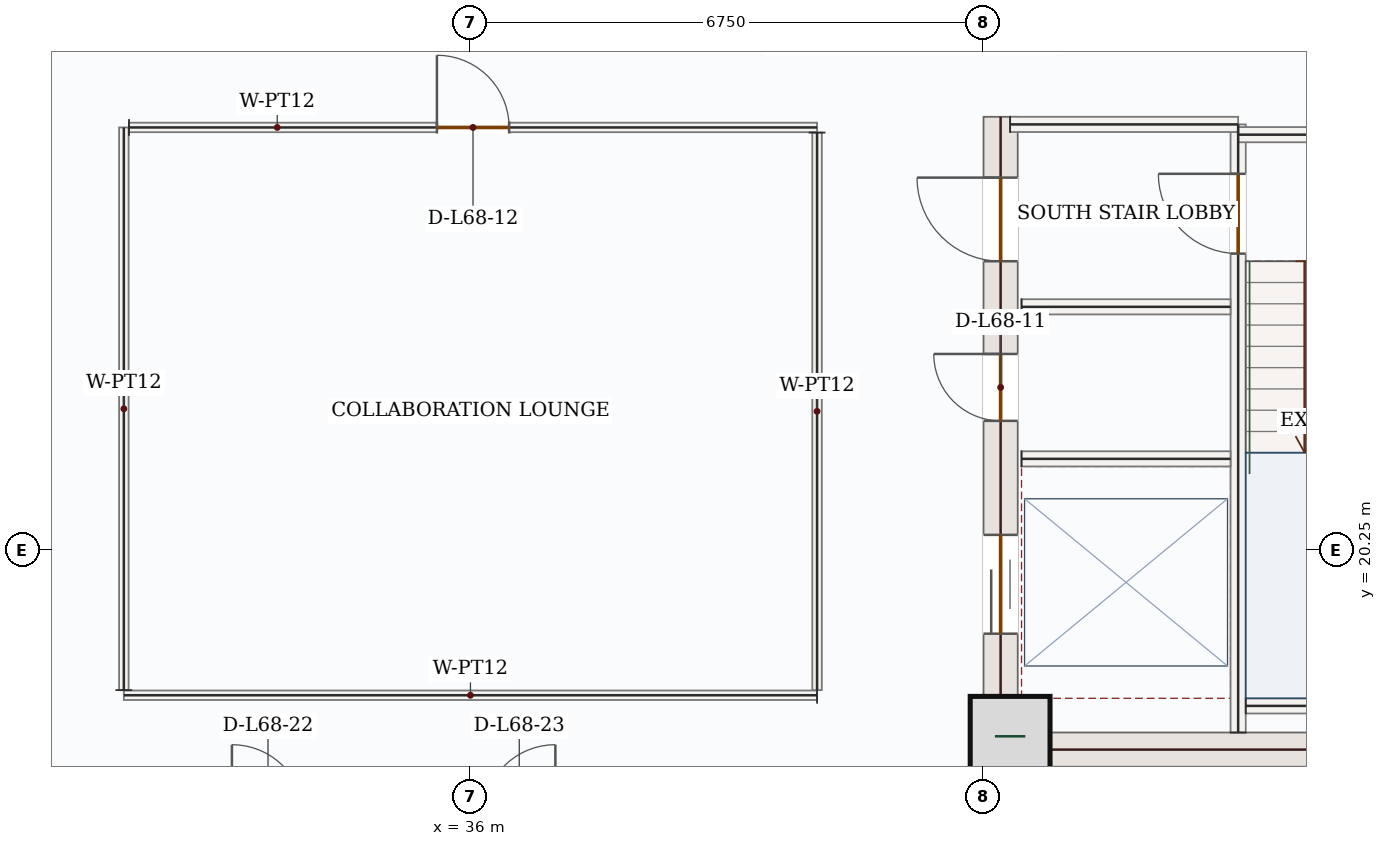
"""IFC4 building model, lengths in metres.
Left out: names, types, materials, properties, quantities, classifications, styles, units other than length and angle.
Written with IfcOpenShell. Run it as: python <this file> out.ifc"""

import sys

from ifc_helpers import new_model, si_unit, direction, frame, frame_2d, origin, origin_2d, place, context, subcontext, project, spatial, rectangle, extrude, source, transform, mapped, element, fill, save


model = new_model("IFC4")
c1 = context("Model", 3, precision=1e-05, world=origin(), true_north=direction((0.0, 1.0)))
c2 = subcontext(c1, "Body", "Model", "MODEL_VIEW")
j1 = project(units=[si_unit("LENGTHUNIT", "METRE"), si_unit("PLANEANGLEUNIT", "RADIAN")], contexts=[c1])
p1 = place(None, origin())
s1 = spatial("IfcSite", under=j1, at=p1, CompositionType="ELEMENT")
p2 = place(p1, origin())
s2 = spatial("IfcBuilding", under=s1, at=p2, CompositionType="ELEMENT")
p3 = place(p2, frame((0.0, 0.0, 284.1)))
s3 = spatial("IfcBuildingStorey", under=s2, at=p3, CompositionType="ELEMENT", Elevation=284.1)
p4 = place(p3, frame((42.975, 17.4, 0.0), z_axis=(0.0, 0.0, 1.0), x_axis=(0.0, 1.0, 0.0)))
e1 = element("IfcWall", 1, at=p4, inside=s3, PredefinedType="SHEAR", context=c2, shape_type="SweptSolid", body=[
    extrude(rectangle(XDim=8.55, YDim=0.45, at=frame_2d((4.275, 0.0))), origin(), (0.0, 0.0, 1.0), 3.5),
])
p5 = place(p4, frame((6.65, 0.0, 0.0)))
e2 = element("IfcOpeningElement", 2, at=p5, cuts=e1, PredefinedType="OPENING", context=c2, shape_type="SweptSolid", body=[
    extrude(rectangle(XDim=1.1, YDim=2.2, at=frame_2d((0.55, 1.1))), frame((0.0, 0.235, 0.0), z_axis=(0.0, -1.0, 0.0), x_axis=(1.0, 0.0, 0.0)), (0.0, 0.0, 1.0), 0.47),
])
p6 = place(p4, frame((1.75, 0.0, 0.0)))
e3 = element("IfcOpeningElement", 3, at=p6, cuts=e1, PredefinedType="OPENING", context=c2, shape_type="SweptSolid", body=[
    extrude(rectangle(XDim=1.3, YDim=2.2, at=frame_2d((0.65, 1.1))), frame((0.0, 0.235, 0.0), z_axis=(0.0, -1.0, 0.0), x_axis=(1.0, 0.0, 0.0)), (0.0, 0.0, 1.0), 0.47),
])
p7 = place(p4, frame((4.55, 0.0, 0.0)))
e4 = element("IfcOpeningElement", 4, at=p7, cuts=e1, PredefinedType="OPENING", context=c2, shape_type="SweptSolid", body=[
    extrude(rectangle(XDim=0.88, YDim=2.1, at=frame_2d((0.44, 1.05))), frame((0.0, 0.235, 0.0), z_axis=(0.0, -1.0, 0.0), x_axis=(1.0, 0.0, 0.0)), (0.0, 0.0, 1.0), 0.47),
])
m1 = source(origin(), c2, "Body", "SweptSolid", [
    extrude(rectangle(XDim=7.1, YDim=0.45, at=frame_2d((3.55, 0.0))), origin(), (0.0, 0.0, 1.0), 3.5),
])
p8 = place(p3, frame((43.2, 17.625, 0.0), z_axis=(0.0, 0.0, 1.0), x_axis=(1.0, 0.0, 0.0)))
e5 = element("IfcWall", 5, at=p8, inside=s3, PredefinedType="SHEAR", context=c2, shape_type="MappedRepresentation", body=[
    mapped(m1, transform((0.0, 0.0, 0.0), x_axis=(1.0, 0.0, 0.0), y_axis=(0.0, 1.0, 0.0), z_axis=(0.0, 0.0, 1.0), scale=1.0)),
])
m2 = source(origin(), c2, "Body", "SweptSolid", [
    extrude(rectangle(XDim=1.05, YDim=1.05, at=origin_2d()), origin(), (0.0, 0.0, 1.0), 3.75),
])
p9 = place(p3, frame((43.1, 17.8, 0.0), z_axis=(0.0, 0.0, 1.0), x_axis=(1.0, 0.0, 0.0)))
e6 = element("IfcColumn", 6, at=p9, inside=s3, PredefinedType="COLUMN", context=c2, shape_type="MappedRepresentation", body=[
    mapped(m2, transform((0.0, 0.0, 0.0), x_axis=(1.0, 0.0, 0.0), y_axis=(0.0, 1.0, 0.0), z_axis=(0.0, 0.0, 1.0), scale=1.0)),
])
p10 = place(p3, frame((46.1, 17.85, 0.0), z_axis=(0.0, 0.0, 1.0), x_axis=(0.0, 1.0, 0.0)))
e7 = element("IfcWall", 7, at=p10, inside=s3, PredefinedType="SOLIDWALL", context=c2, shape_type="SweptSolid", body=[
    extrude(rectangle(XDim=8.0, YDim=0.2, at=frame_2d((4.0, 0.0))), origin(), (0.0, 0.0, 1.0), 3.5),
])
p11 = place(p10, frame((6.3, 0.0, 0.0)))
e8 = element("IfcOpeningElement", 8, at=p11, cuts=e7, PredefinedType="OPENING", context=c2, shape_type="SweptSolid", body=[
    extrude(rectangle(XDim=1.05, YDim=2.15, at=frame_2d((0.525, 1.075))), frame((0.0, 0.11, 0.0), z_axis=(0.0, -1.0, 0.0), x_axis=(1.0, 0.0, 0.0)), (0.0, 0.0, 1.0), 0.22),
])
m3 = source(origin(), c2, "Body", "SweptSolid", [
    extrude(rectangle(XDim=3.0, YDim=0.2, at=frame_2d((1.5, 0.0))), origin(), (0.0, 0.0, 1.0), 3.5),
])
p12 = place(p3, frame((43.1, 25.85, 0.0), z_axis=(0.0, 0.0, 1.0), x_axis=(1.0, 0.0, 0.0)))
e9 = element("IfcWall", 9, at=p12, inside=s3, PredefinedType="SOLIDWALL", context=c2, shape_type="MappedRepresentation", body=[
    mapped(m3, transform((0.0, 0.0, 0.0), x_axis=(1.0, 0.0, 0.0), y_axis=(0.0, 1.0, 0.0), z_axis=(0.0, 0.0, 1.0), scale=1.0)),
])
m4 = source(origin(), c2, "Body", "SweptSolid", [
    extrude(rectangle(XDim=4.25, YDim=0.2, at=frame_2d((2.125, 0.0))), origin(), (0.0, 0.0, 1.0), 3.5),
])
p13 = place(p3, frame((46.1, 25.715, 0.0), z_axis=(0.0, 0.0, 1.0), x_axis=(1.0, 0.0, 0.0)))
e10 = element("IfcWall", 10, at=p13, inside=s3, PredefinedType="SOLIDWALL", context=c2, shape_type="MappedRepresentation", body=[
    mapped(m4, transform((0.0, 0.0, 0.0), x_axis=(1.0, 0.0, 0.0), y_axis=(0.0, 1.0, 0.0), z_axis=(0.0, 0.0, 1.0), scale=1.0)),
])
m5 = source(origin(), c2, "Body", "SweptSolid", [
    extrude(rectangle(XDim=3.25, YDim=0.2, at=frame_2d((1.625, 0.0))), origin(), (0.0, 0.0, 1.0), 3.5),
])
p14 = place(p3, frame((46.2, 18.2, 0.0), z_axis=(0.0, 0.0, 1.0), x_axis=(1.0, 0.0, 0.0)))
e11 = element("IfcWall", 11, at=p14, inside=s3, PredefinedType="SOLIDWALL", context=c2, shape_type="MappedRepresentation", body=[
    mapped(m5, transform((0.0, 0.0, 0.0), x_axis=(1.0, 0.0, 0.0), y_axis=(0.0, 1.0, 0.0), z_axis=(0.0, 0.0, 1.0), scale=1.0)),
])
m6 = source(origin(), c2, "Body", "SweptSolid", [
    extrude(rectangle(XDim=2.75, YDim=0.2, at=frame_2d((1.375, 0.0))), origin(), (0.0, 0.0, 1.0), 3.5),
])
for number, where, z_axis, x_axis in (
    (12, (43.25, 23.45, 0.0), (0.0, 0.0, 1.0), (1.0, 0.0, 0.0)),
    (13, (43.25, 21.45, 0.0), (0.0, 0.0, 1.0), (1.0, 0.0, 0.0)),
):
    element("IfcWall", number, at=place(p3, frame(where, z_axis=z_axis, x_axis=x_axis)), inside=s3, PredefinedType="SOLIDWALL", context=c2, shape_type="MappedRepresentation", body=[
        mapped(m6, transform((0.0, 0.0, 0.0), x_axis=(1.0, 0.0, 0.0), y_axis=(0.0, 1.0, 0.0), z_axis=(0.0, 0.0, 1.0), scale=1.0)),
    ])
m7 = source(origin(), c2, "Body", "SweptSolid", [
    extrude(rectangle(XDim=9.12, YDim=0.125, at=frame_2d((4.56, 0.0))), origin(), (0.0, 0.0, 1.0), 3.5),
])
p15 = place(p3, frame((40.56, 18.34, 0.0), z_axis=(0.0, 0.0, 1.0), x_axis=(-1.0, 0.0, 0.0)))
e14 = element("IfcWall", 14, at=p15, inside=s3, PredefinedType="PARTITIONING", context=c2, shape_type="MappedRepresentation", body=[
    mapped(m7, transform((0.0, 0.0, 0.0), x_axis=(1.0, 0.0, 0.0), y_axis=(0.0, 1.0, 0.0), z_axis=(0.0, 0.0, 1.0), scale=1.0)),
])
m8 = source(origin(), c2, "Body", "SweptSolid", [
    extrude(rectangle(XDim=7.403, YDim=0.125, at=frame_2d((3.701, 0.0))), origin(), (0.0, 0.0, 1.0), 3.5),
])
p16 = place(p3, frame((31.44, 18.407, 0.0), z_axis=(0.0, 0.0, 1.0), x_axis=(0.0, 1.0, 0.0)))
e15 = element("IfcWall", 15, at=p16, inside=s3, PredefinedType="PARTITIONING", context=c2, shape_type="MappedRepresentation", body=[
    mapped(m8, transform((0.0, 0.0, 0.0), x_axis=(1.0, 0.0, 0.0), y_axis=(0.0, 1.0, 0.0), z_axis=(0.0, 0.0, 1.0), scale=1.0)),
])
p17 = place(p3, frame((31.508, 25.81, 0.0), z_axis=(0.0, 0.0, 1.0), x_axis=(1.0, 0.0, 0.0)))
e16 = element("IfcWall", 16, at=p17, inside=s3, PredefinedType="PARTITIONING", context=c2, shape_type="SweptSolid", body=[
    extrude(rectangle(XDim=9.052, YDim=0.125, at=frame_2d((4.526, 0.0))), origin(), (0.0, 0.0, 1.0), 3.5),
])
p18 = place(p17, frame((4.051, 0.0, 0.0)))
e17 = element("IfcOpeningElement", 17, at=p18, cuts=e16, PredefinedType="OPENING", context=c2, shape_type="SweptSolid", body=[
    extrude(rectangle(XDim=0.95, YDim=2.15, at=frame_2d((0.475, 1.075))), frame((0.0, 0.073, 0.0), z_axis=(0.0, -1.0, 0.0), x_axis=(1.0, 0.0, 0.0)), (0.0, 0.0, 1.0), 0.145),
])
m9 = source(origin(), c2, "Body", "SweptSolid", [
    extrude(rectangle(XDim=7.335, YDim=0.125, at=frame_2d((3.667, 0.0))), origin(), (0.0, 0.0, 1.0), 3.5),
])
p19 = place(p3, frame((40.56, 25.742, 0.0), z_axis=(0.0, 0.0, 1.0), x_axis=(0.0, -1.0, 0.0)))
e18 = element("IfcWall", 18, at=p19, inside=s3, PredefinedType="PARTITIONING", context=c2, shape_type="MappedRepresentation", body=[
    mapped(m9, transform((0.0, 0.0, 0.0), x_axis=(1.0, 0.0, 0.0), y_axis=(0.0, 1.0, 0.0), z_axis=(0.0, 0.0, 1.0), scale=1.0)),
])
m10 = source(origin(), c2, "Body", "SweptSolid", [
    extrude(rectangle(XDim=1.05, YDim=2.15, at=frame_2d((0.525, 1.075))), frame((0.0, 0.025, 0.0), z_axis=(0.0, -1.0, 0.0), x_axis=(1.0, 0.0, 0.0)), (0.0, 0.0, 1.0), 0.05),
])
p20 = place(p11, origin())
e19 = element("IfcDoor", 19, at=p20, inside=s3, OperationType="SINGLE_SWING_RIGHT", PredefinedType="DOOR", context=c2, shape_type="MappedRepresentation", body=[
    mapped(m10, transform((0.0, 0.0, 0.0), x_axis=(1.0, 0.0, 0.0), y_axis=(0.0, 1.0, 0.0), z_axis=(0.0, 0.0, 1.0), scale=1.0)),
])
fill(e8, e19)
m11 = source(origin(), c2, "Body", "SweptSolid", [
    extrude(rectangle(XDim=1.1, YDim=2.2, at=frame_2d((0.55, 1.1))), frame((0.0, 0.025, 0.0), z_axis=(0.0, -1.0, 0.0), x_axis=(1.0, 0.0, 0.0)), (0.0, 0.0, 1.0), 0.05),
])
p21 = place(p5, origin())
e20 = element("IfcDoor", 20, at=p21, inside=s3, OperationType="SINGLE_SWING_RIGHT", PredefinedType="DOOR", context=c2, shape_type="MappedRepresentation", body=[
    mapped(m11, transform((0.0, 0.0, 0.0), x_axis=(1.0, 0.0, 0.0), y_axis=(0.0, 1.0, 0.0), z_axis=(0.0, 0.0, 1.0), scale=1.0)),
])
fill(e2, e20)
m12 = source(origin(), c2, "Body", "SweptSolid", [
    extrude(rectangle(XDim=1.3, YDim=2.2, at=frame_2d((0.65, 1.1))), frame((0.0, 0.025, 0.0), z_axis=(0.0, -1.0, 0.0), x_axis=(1.0, 0.0, 0.0)), (0.0, 0.0, 1.0), 0.05),
])
p22 = place(p6, origin())
e21 = element("IfcDoor", 21, at=p22, inside=s3, OperationType="DOUBLE_DOOR_SLIDING", PredefinedType="DOOR", context=c2, shape_type="MappedRepresentation", body=[
    mapped(m12, transform((0.0, 0.0, 0.0), x_axis=(1.0, 0.0, 0.0), y_axis=(0.0, 1.0, 0.0), z_axis=(0.0, 0.0, 1.0), scale=1.0)),
])
fill(e3, e21)
m13 = source(origin(), c2, "Body", "SweptSolid", [
    extrude(rectangle(XDim=0.88, YDim=2.1, at=frame_2d((0.44, 1.05))), frame((0.0, 0.025, 0.0), z_axis=(0.0, -1.0, 0.0), x_axis=(1.0, 0.0, 0.0)), (0.0, 0.0, 1.0), 0.05),
])
p23 = place(p7, origin())
e22 = element("IfcDoor", 22, at=p23, inside=s3, OperationType="SINGLE_SWING_RIGHT", PredefinedType="DOOR", context=c2, shape_type="MappedRepresentation", body=[
    mapped(m13, transform((0.0, 0.0, 0.0), x_axis=(1.0, 0.0, 0.0), y_axis=(0.0, 1.0, 0.0), z_axis=(0.0, 0.0, 1.0), scale=1.0)),
])
fill(e4, e22)
m14 = source(origin(), c2, "Body", "SweptSolid", [
    extrude(rectangle(XDim=0.95, YDim=2.15, at=frame_2d((0.475, 1.075))), frame((0.0, 0.025, 0.0), z_axis=(0.0, -1.0, 0.0), x_axis=(1.0, 0.0, 0.0)), (0.0, 0.0, 1.0), 0.05),
])
p24 = place(p18, origin())
e23 = element("IfcDoor", 23, at=p24, inside=s3, OperationType="SINGLE_SWING_LEFT", PredefinedType="DOOR", context=c2, shape_type="MappedRepresentation", body=[
    mapped(m14, transform((0.0, 0.0, 0.0), x_axis=(1.0, 0.0, 0.0), y_axis=(0.0, 1.0, 0.0), z_axis=(0.0, 0.0, 1.0), scale=1.0)),
])
fill(e17, e23)
save(model, sys.argv[1])
